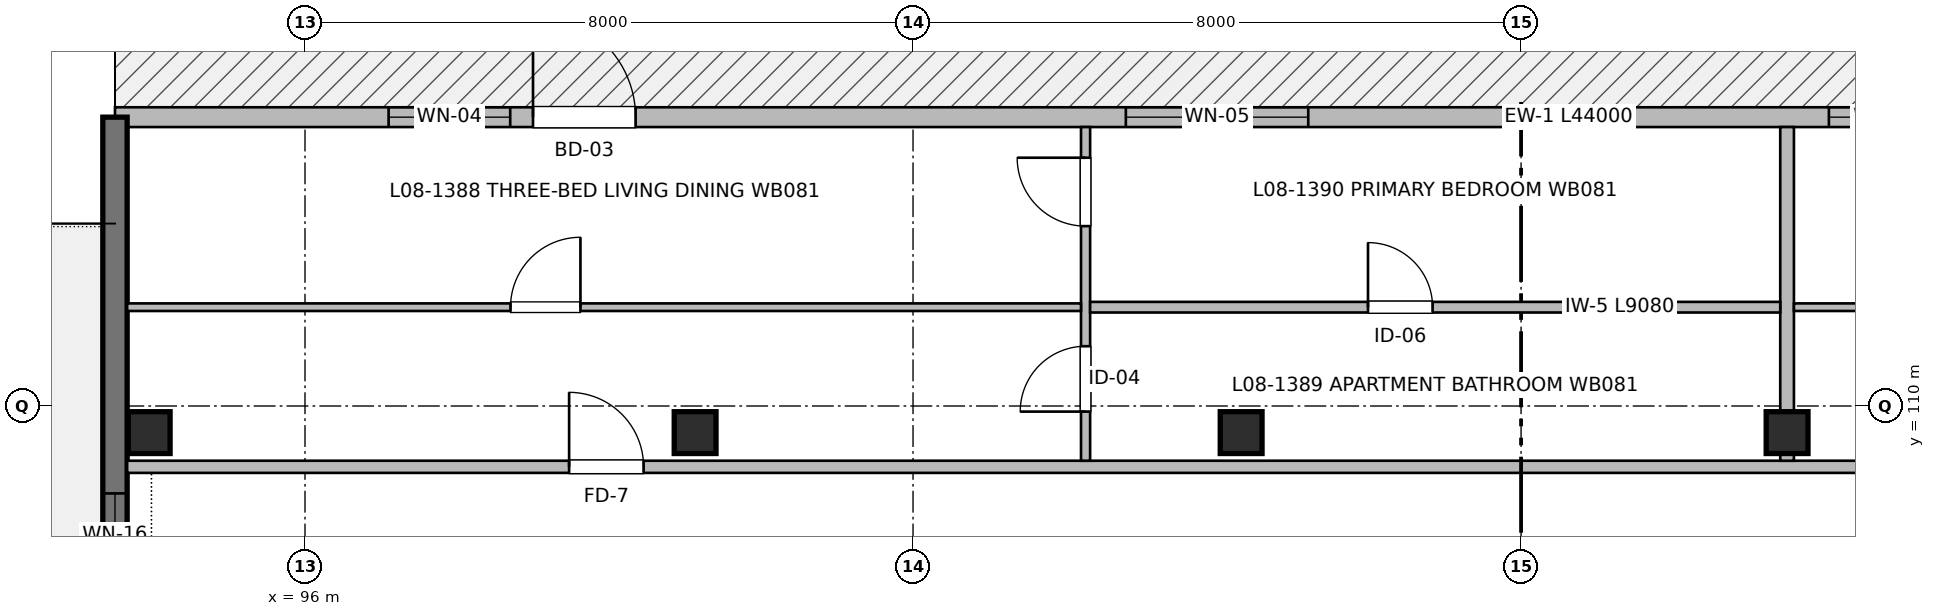
"""IFC4 building model, lengths in metres.
Left out: names, types, materials, properties, quantities, classifications, styles, units other than length and angle.
Written with IfcOpenShell. Run it as: python <this file> out.ifc"""

import sys

from ifc_helpers import new_model, si_unit, direction, frame, frame_2d, origin, origin_2d, place, context, subcontext, project, spatial, rectangle, extrude, element, fill, save


model = new_model("IFC4")
c1 = context("Model", 3, precision=1e-05, world=origin(), true_north=direction((0.0, 1.0)))
c2 = subcontext(c1, "Body", "Model", "MODEL_VIEW")
j1 = project(units=[si_unit("LENGTHUNIT", "METRE"), si_unit("PLANEANGLEUNIT", "RADIAN")], contexts=[c1])
p1 = place(None, origin())
s1 = spatial("IfcSite", under=j1, at=p1, CompositionType="ELEMENT")
p2 = place(p1, origin())
s2 = spatial("IfcBuilding", under=s1, at=p2, CompositionType="ELEMENT")
p3 = place(p2, frame((0.0, 0.0, 26.56)))
s3 = spatial("IfcBuildingStorey", under=s2, at=p3, CompositionType="ELEMENT", Elevation=26.56)
for number, where, z_axis, x_axis in (
    (1, (93.95, 109.65, 0.0), (0.0, 0.0, 1.0), (1.0, 0.0, 0.0)),
    (2, (101.133, 109.65, 0.0), (0.0, 0.0, 1.0), (1.0, 0.0, 0.0)),
    (3, (108.317, 109.65, 0.0), (0.0, 0.0, 1.0), (1.0, 0.0, 0.0)),
    (4, (115.5, 109.65, 0.0), (0.0, 0.0, 1.0), (1.0, 0.0, 0.0)),
):
    element("IfcColumn", number, at=place(p3, frame(where, z_axis=z_axis, x_axis=x_axis)), inside=s3, PredefinedType="COLUMN", context=c2, shape_type="SweptSolid", body=[
        extrude(rectangle(XDim=0.55, YDim=0.55, at=origin_2d()), origin(), (0.0, 0.0, 1.0), 3.2),
    ])
p4 = place(p3, frame((93.5, 113.8, 0.0), z_axis=(0.0, 0.0, 1.0), x_axis=(1.0, 0.0, 0.0)))
e5 = element("IfcWall", 5, at=p4, inside=s3, PredefinedType="SOLIDWALL", context=c2, shape_type="SweptSolid", body=[
    extrude(rectangle(XDim=44.0, YDim=0.26, at=frame_2d((22.0, 0.0))), origin(), (0.0, 0.0, 1.0), 2.98),
])
p5 = place(p4, frame((5.5, 0.0, 0.0)))
e6 = element("IfcOpeningElement", 6, at=p5, cuts=e5, PredefinedType="OPENING", context=c2, shape_type="SweptSolid", body=[
    extrude(rectangle(XDim=1.35, YDim=2.2, at=frame_2d((0.675, 1.1))), frame((0.0, 0.14, 0.0), z_axis=(0.0, -1.0, 0.0), x_axis=(1.0, 0.0, 0.0)), (0.0, 0.0, 1.0), 0.28),
])
p6 = place(p4, frame((3.6, 0.0, 0.77)))
e7 = element("IfcOpeningElement", 7, at=p6, cuts=e5, PredefinedType="OPENING", context=c2, shape_type="SweptSolid", body=[
    extrude(rectangle(XDim=1.6, YDim=1.45, at=frame_2d((0.8, 0.725))), frame((0.0, 0.14, 0.0), z_axis=(0.0, -1.0, 0.0), x_axis=(1.0, 0.0, 0.0)), (0.0, 0.0, 1.0), 0.28),
])
p7 = place(p4, frame((13.3, 0.0, 0.72)))
e8 = element("IfcOpeningElement", 8, at=p7, cuts=e5, PredefinedType="OPENING", context=c2, shape_type="SweptSolid", body=[
    extrude(rectangle(XDim=2.4, YDim=1.5, at=frame_2d((1.2, 0.75))), frame((0.0, 0.14, 0.0), z_axis=(0.0, -1.0, 0.0), x_axis=(1.0, 0.0, 0.0)), (0.0, 0.0, 1.0), 0.28),
])
p8 = place(p4, frame((22.55, 0.0, 0.82)))
e9 = element("IfcOpeningElement", 9, at=p8, cuts=e5, PredefinedType="OPENING", context=c2, shape_type="SweptSolid", body=[
    extrude(rectangle(XDim=1.5, YDim=1.4, at=frame_2d((0.75, 0.7))), frame((0.0, 0.14, 0.0), z_axis=(0.0, -1.0, 0.0), x_axis=(1.0, 0.0, 0.0)), (0.0, 0.0, 1.0), 0.28),
])
p9 = place(p4, frame((30.025, 0.0, 0.82)))
e10 = element("IfcOpeningElement", 10, at=p9, cuts=e5, PredefinedType="OPENING", context=c2, shape_type="SweptSolid", body=[
    extrude(rectangle(XDim=1.55, YDim=1.4, at=frame_2d((0.775, 0.7))), frame((0.0, 0.14, 0.0), z_axis=(0.0, -1.0, 0.0), x_axis=(1.0, 0.0, 0.0)), (0.0, 0.0, 1.0), 0.28),
])
p10 = place(p4, frame((38.9, 0.0, 0.87)))
e11 = element("IfcOpeningElement", 11, at=p10, cuts=e5, PredefinedType="OPENING", context=c2, shape_type="SweptSolid", body=[
    extrude(rectangle(XDim=1.4, YDim=1.35, at=frame_2d((0.7, 0.675))), frame((0.0, 0.14, 0.0), z_axis=(0.0, -1.0, 0.0), x_axis=(1.0, 0.0, 0.0)), (0.0, 0.0, 1.0), 0.28),
])
p11 = place(p3, frame((93.5, 100.0, 0.0), z_axis=(0.0, 0.0, 1.0), x_axis=(0.0, 1.0, 0.0)))
e12 = element("IfcWall", 12, at=p11, inside=s3, PredefinedType="SHEAR", context=c2, shape_type="SweptSolid", body=[
    extrude(rectangle(XDim=13.8, YDim=0.32, at=frame_2d((6.9, 0.0))), origin(), (0.0, 0.0, 1.0), 2.98),
])
p12 = place(p11, frame((5.0, 0.0, 0.0)))
e13 = element("IfcOpeningElement", 13, at=p12, cuts=e12, PredefinedType="OPENING", context=c2, shape_type="SweptSolid", body=[
    extrude(rectangle(XDim=1.2, YDim=2.2, at=frame_2d((0.6, 1.1))), frame((0.0, 0.17, 0.0), z_axis=(0.0, -1.0, 0.0), x_axis=(1.0, 0.0, 0.0)), (0.0, 0.0, 1.0), 0.34),
])
p13 = place(p11, frame((7.75, 0.0, 0.62)))
e14 = element("IfcOpeningElement", 14, at=p13, cuts=e12, PredefinedType="OPENING", context=c2, shape_type="SweptSolid", body=[
    extrude(rectangle(XDim=1.1, YDim=1.6, at=frame_2d((0.55, 0.8))), frame((0.0, 0.17, 0.0), z_axis=(0.0, -1.0, 0.0), x_axis=(1.0, 0.0, 0.0)), (0.0, 0.0, 1.0), 0.34),
])
p14 = place(p3, frame((93.66, 109.2, 0.0), z_axis=(0.0, 0.0, 1.0), x_axis=(1.0, 0.0, 0.0)))
e15 = element("IfcWall", 15, at=p14, inside=s3, PredefinedType="PARTITIONING", context=c2, shape_type="SweptSolid", body=[
    extrude(rectangle(XDim=43.68, YDim=0.16, at=frame_2d((21.84, 0.0))), origin(), (0.0, 0.0, 1.0), 2.935),
])
p15 = place(p14, frame((5.815, 0.0, 0.0)))
e16 = element("IfcOpeningElement", 16, at=p15, cuts=e15, PredefinedType="OPENING", context=c2, shape_type="SweptSolid", body=[
    extrude(rectangle(XDim=0.98, YDim=2.15, at=frame_2d((0.49, 1.075))), frame((0.0, 0.09, 0.0), z_axis=(0.0, -1.0, 0.0), x_axis=(1.0, 0.0, 0.0)), (0.0, 0.0, 1.0), 0.18),
])
p16 = place(p14, frame((27.35, 0.0, 0.0)))
e17 = element("IfcOpeningElement", 17, at=p16, cuts=e15, PredefinedType="OPENING", context=c2, shape_type="SweptSolid", body=[
    extrude(rectangle(XDim=0.98, YDim=2.15, at=frame_2d((0.49, 1.075))), frame((0.0, 0.09, 0.0), z_axis=(0.0, -1.0, 0.0), x_axis=(1.0, 0.0, 0.0)), (0.0, 0.0, 1.0), 0.18),
])
p17 = place(p3, frame((115.5, 109.28, 0.0), z_axis=(0.0, 0.0, 1.0), x_axis=(0.0, 1.0, 0.0)))
e18 = element("IfcWall", 18, at=p17, inside=s3, PredefinedType="PARTITIONING", context=c2, shape_type="SweptSolid", body=[
    extrude(rectangle(XDim=4.39, YDim=0.18, at=frame_2d((2.195, 0.0))), origin(), (0.0, 0.0, 1.0), 2.935),
])
p18 = place(p3, frame((106.27, 109.28, 0.0), z_axis=(0.0, 0.0, 1.0), x_axis=(0.0, 1.0, 0.0)))
e19 = element("IfcWall", 19, at=p18, inside=s3, PredefinedType="PARTITIONING", context=c2, shape_type="SweptSolid", body=[
    extrude(rectangle(XDim=4.39, YDim=0.12, at=frame_2d((2.195, 0.0))), origin(), (0.0, 0.0, 1.0), 2.935),
])
p19 = place(p18, frame((0.646, 0.0, 0.0)))
e20 = element("IfcOpeningElement", 20, at=p19, cuts=e19, PredefinedType="OPENING", context=c2, shape_type="SweptSolid", body=[
    extrude(rectangle(XDim=0.86, YDim=2.1, at=frame_2d((0.43, 1.05))), frame((0.0, 0.07, 0.0), z_axis=(0.0, -1.0, 0.0), x_axis=(1.0, 0.0, 0.0)), (0.0, 0.0, 1.0), 0.14),
])
p20 = place(p18, frame((3.086, 0.0, 0.0)))
e21 = element("IfcOpeningElement", 21, at=p20, cuts=e19, PredefinedType="OPENING", context=c2, shape_type="SweptSolid", body=[
    extrude(rectangle(XDim=0.9, YDim=2.1, at=frame_2d((0.45, 1.05))), frame((0.0, 0.07, 0.0), z_axis=(0.0, -1.0, 0.0), x_axis=(1.0, 0.0, 0.0)), (0.0, 0.0, 1.0), 0.14),
])
p21 = place(p3, frame((106.33, 111.3, 0.0), z_axis=(0.0, 0.0, 1.0), x_axis=(1.0, 0.0, 0.0)))
e22 = element("IfcWall", 22, at=p21, inside=s3, PredefinedType="PARTITIONING", context=c2, shape_type="SweptSolid", body=[
    extrude(rectangle(XDim=9.08, YDim=0.14, at=frame_2d((4.54, 0.0))), origin(), (0.0, 0.0, 1.0), 2.935),
])
p22 = place(p21, frame((3.656, 0.0, 0.0)))
e23 = element("IfcOpeningElement", 23, at=p22, cuts=e22, PredefinedType="OPENING", context=c2, shape_type="SweptSolid", body=[
    extrude(rectangle(XDim=0.85, YDim=2.05, at=frame_2d((0.425, 1.025))), frame((0.0, 0.08, 0.0), z_axis=(0.0, -1.0, 0.0), x_axis=(1.0, 0.0, 0.0)), (0.0, 0.0, 1.0), 0.16),
])
p23 = place(p3, frame((93.66, 111.3, 0.0), z_axis=(0.0, 0.0, 1.0), x_axis=(1.0, 0.0, 0.0)))
e24 = element("IfcWall", 24, at=p23, inside=s3, PredefinedType="PARTITIONING", context=c2, shape_type="SweptSolid", body=[
    extrude(rectangle(XDim=12.55, YDim=0.1, at=frame_2d((6.275, 0.0))), origin(), (0.0, 0.0, 1.0), 2.935),
])
p24 = place(p23, frame((5.044, 0.0, 0.0)))
e25 = element("IfcOpeningElement", 25, at=p24, cuts=e24, PredefinedType="OPENING", context=c2, shape_type="SweptSolid", body=[
    extrude(rectangle(XDim=0.92, YDim=2.1, at=frame_2d((0.46, 1.05))), frame((0.0, 0.06, 0.0), z_axis=(0.0, -1.0, 0.0), x_axis=(1.0, 0.0, 0.0)), (0.0, 0.0, 1.0), 0.12),
])
p25 = place(p3, frame((115.59, 111.3, 0.0), z_axis=(0.0, 0.0, 1.0), x_axis=(1.0, 0.0, 0.0)))
e26 = element("IfcWall", 26, at=p25, inside=s3, PredefinedType="PARTITIONING", context=c2, shape_type="SweptSolid", body=[
    extrude(rectangle(XDim=12.56, YDim=0.1, at=frame_2d((6.28, 0.0))), origin(), (0.0, 0.0, 1.0), 2.935),
])
p26 = place(p25, frame((5.048, 0.0, 0.0)))
e27 = element("IfcOpeningElement", 27, at=p26, cuts=e26, PredefinedType="OPENING", context=c2, shape_type="SweptSolid", body=[
    extrude(rectangle(XDim=0.92, YDim=2.1, at=frame_2d((0.46, 1.05))), frame((0.0, 0.06, 0.0), z_axis=(0.0, -1.0, 0.0), x_axis=(1.0, 0.0, 0.0)), (0.0, 0.0, 1.0), 0.12),
])
p27 = place(p5, origin())
e28 = element("IfcDoor", 28, at=p27, inside=s3, OperationType="SINGLE_SWING_LEFT", PredefinedType="DOOR", context=c2, shape_type="SweptSolid", body=[
    extrude(rectangle(XDim=1.35, YDim=2.2, at=frame_2d((0.675, 1.1))), frame((0.0, 0.025, 0.0), z_axis=(0.0, -1.0, 0.0), x_axis=(1.0, 0.0, 0.0)), (0.0, 0.0, 1.0), 0.05),
])
fill(e6, e28)
p28 = place(p6, origin())
e29 = element("IfcWindow", 29, at=p28, inside=s3, PartitioningType="SINGLE_PANEL", PredefinedType="WINDOW", context=c2, shape_type="SweptSolid", body=[
    extrude(rectangle(XDim=1.6, YDim=1.45, at=frame_2d((0.8, 0.725))), frame((0.0, 0.03, 0.0), z_axis=(0.0, -1.0, 0.0), x_axis=(1.0, 0.0, 0.0)), (0.0, 0.0, 1.0), 0.06),
])
fill(e7, e29)
p29 = place(p7, origin())
e30 = element("IfcWindow", 30, at=p29, inside=s3, PartitioningType="SINGLE_PANEL", PredefinedType="WINDOW", context=c2, shape_type="SweptSolid", body=[
    extrude(rectangle(XDim=2.4, YDim=1.5, at=frame_2d((1.2, 0.75))), frame((0.0, 0.03, 0.0), z_axis=(0.0, -1.0, 0.0), x_axis=(1.0, 0.0, 0.0)), (0.0, 0.0, 1.0), 0.06),
])
fill(e8, e30)
p30 = place(p8, origin())
e31 = element("IfcWindow", 31, at=p30, inside=s3, PartitioningType="SINGLE_PANEL", PredefinedType="WINDOW", context=c2, shape_type="SweptSolid", body=[
    extrude(rectangle(XDim=1.5, YDim=1.4, at=frame_2d((0.75, 0.7))), frame((0.0, 0.03, 0.0), z_axis=(0.0, -1.0, 0.0), x_axis=(1.0, 0.0, 0.0)), (0.0, 0.0, 1.0), 0.06),
])
fill(e9, e31)
p31 = place(p13, origin())
e32 = element("IfcWindow", 32, at=p31, inside=s3, PartitioningType="SINGLE_PANEL", PredefinedType="WINDOW", context=c2, shape_type="SweptSolid", body=[
    extrude(rectangle(XDim=1.1, YDim=1.6, at=frame_2d((0.55, 0.8))), frame((0.0, 0.03, 0.0), z_axis=(0.0, -1.0, 0.0), x_axis=(1.0, 0.0, 0.0)), (0.0, 0.0, 1.0), 0.06),
])
fill(e14, e32)
p32 = place(p15, origin())
e33 = element("IfcDoor", 33, at=p32, inside=s3, OperationType="SINGLE_SWING_LEFT", PredefinedType="DOOR", context=c2, shape_type="SweptSolid", body=[
    extrude(rectangle(XDim=0.98, YDim=2.15, at=frame_2d((0.49, 1.075))), frame((0.0, 0.025, 0.0), z_axis=(0.0, -1.0, 0.0), x_axis=(1.0, 0.0, 0.0)), (0.0, 0.0, 1.0), 0.05),
])
fill(e16, e33)
p33 = place(p24, origin())
e34 = element("IfcDoor", 34, at=p33, inside=s3, OperationType="SINGLE_SWING_RIGHT", PredefinedType="DOOR", context=c2, shape_type="SweptSolid", body=[
    extrude(rectangle(XDim=0.92, YDim=2.1, at=frame_2d((0.46, 1.05))), frame((0.0, 0.025, 0.0), z_axis=(0.0, -1.0, 0.0), x_axis=(1.0, 0.0, 0.0)), (0.0, 0.0, 1.0), 0.05),
])
fill(e25, e34)
p34 = place(p19, origin())
e35 = element("IfcDoor", 35, at=p34, inside=s3, OperationType="SINGLE_SWING_LEFT", PredefinedType="DOOR", context=c2, shape_type="SweptSolid", body=[
    extrude(rectangle(XDim=0.86, YDim=2.1, at=frame_2d((0.43, 1.05))), frame((0.0, 0.025, 0.0), z_axis=(0.0, -1.0, 0.0), x_axis=(1.0, 0.0, 0.0)), (0.0, 0.0, 1.0), 0.05),
])
fill(e20, e35)
p35 = place(p20, origin())
e36 = element("IfcDoor", 36, at=p35, inside=s3, OperationType="SINGLE_SWING_RIGHT", PredefinedType="DOOR", context=c2, shape_type="SweptSolid", body=[
    extrude(rectangle(XDim=0.9, YDim=2.1, at=frame_2d((0.45, 1.05))), frame((0.0, 0.025, 0.0), z_axis=(0.0, -1.0, 0.0), x_axis=(1.0, 0.0, 0.0)), (0.0, 0.0, 1.0), 0.05),
])
fill(e21, e36)
p36 = place(p22, origin())
e37 = element("IfcDoor", 37, at=p36, inside=s3, OperationType="SINGLE_SWING_LEFT", PredefinedType="DOOR", context=c2, shape_type="SweptSolid", body=[
    extrude(rectangle(XDim=0.85, YDim=2.05, at=frame_2d((0.425, 1.025))), frame((0.0, 0.025, 0.0), z_axis=(0.0, -1.0, 0.0), x_axis=(1.0, 0.0, 0.0)), (0.0, 0.0, 1.0), 0.05),
])
fill(e23, e37)
save(model, sys.argv[1])
